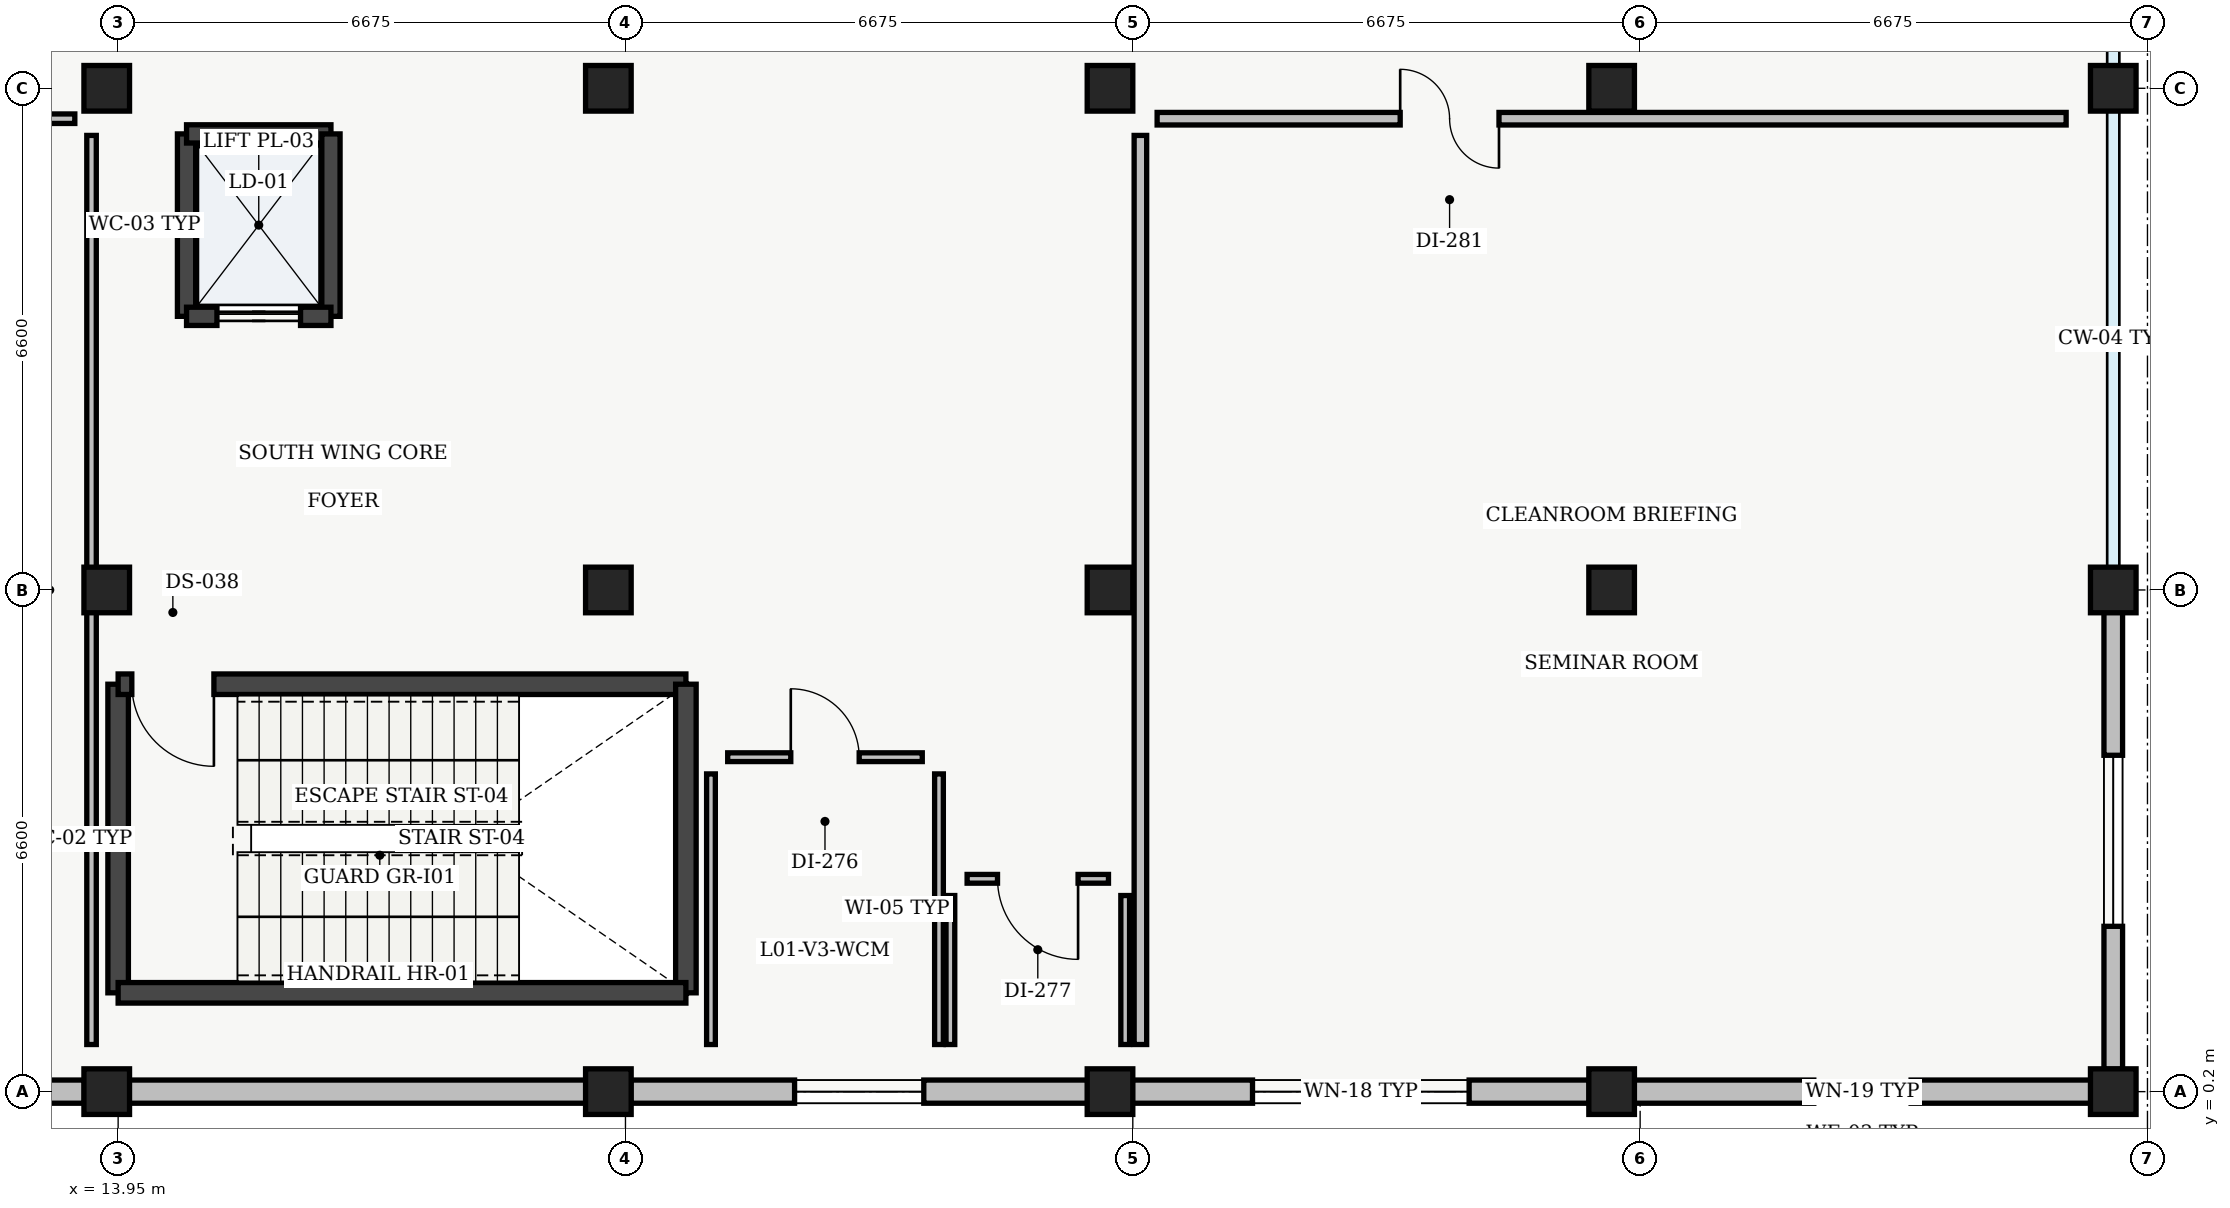
"""IFC4 building model, lengths in metres.
Left out: names, types, materials, properties, quantities, classifications, styles, units other than length and angle.
Written with IfcOpenShell. Run it as: python <this file> out.ifc"""

import sys

from ifc_helpers import new_model, si_unit, direction, frame, frame_2d, origin, origin_2d, place, context, subcontext, project, spatial, rectangle, extrude, element, fill, save


model = new_model("IFC4")
c1 = context("Model", 3, precision=1e-05, world=origin(), true_north=direction((0.0, 1.0)))
c2 = subcontext(c1, "Body", "Model", "MODEL_VIEW")
j1 = project(units=[si_unit("LENGTHUNIT", "METRE"), si_unit("PLANEANGLEUNIT", "RADIAN")], contexts=[c1])
p1 = place(None, origin())
s1 = spatial("IfcSite", under=j1, at=p1, CompositionType="ELEMENT")
p2 = place(p1, origin())
s2 = spatial("IfcBuilding", under=s1, at=p2, CompositionType="ELEMENT")
p3 = place(p2, frame((0.0, 0.0, 5.1)))
s3 = spatial("IfcBuildingStorey", under=s2, at=p3, CompositionType="ELEMENT", Elevation=5.1)
for number, where, z_axis, x_axis in (
    (1, (13.8, 0.2, 0.0), (0.0, 0.0, 1.0), (1.0, 0.0, 0.0)),
    (2, (13.8, 6.8, 0.0), (0.0, 0.0, 1.0), (1.0, 0.0, 0.0)),
    (3, (13.8, 13.4, 0.0), (0.0, 0.0, 1.0), (1.0, 0.0, 0.0)),
    (4, (20.4, 0.2, 0.0), (0.0, 0.0, 1.0), (1.0, 0.0, 0.0)),
    (5, (20.4, 6.8, 0.0), (0.0, 0.0, 1.0), (1.0, 0.0, 0.0)),
    (6, (20.4, 13.4, 0.0), (0.0, 0.0, 1.0), (1.0, 0.0, 0.0)),
    (7, (27.0, 0.2, 0.0), (0.0, 0.0, 1.0), (1.0, 0.0, 0.0)),
    (8, (27.0, 6.8, 0.0), (0.0, 0.0, 1.0), (1.0, 0.0, 0.0)),
    (9, (27.0, 13.4, 0.0), (0.0, 0.0, 1.0), (1.0, 0.0, 0.0)),
    (10, (33.6, 0.2, 0.0), (0.0, 0.0, 1.0), (1.0, 0.0, 0.0)),
    (11, (33.6, 6.8, 0.0), (0.0, 0.0, 1.0), (1.0, 0.0, 0.0)),
    (12, (33.6, 13.4, 0.0), (0.0, 0.0, 1.0), (1.0, 0.0, 0.0)),
    (13, (40.2, 0.2, 0.0), (0.0, 0.0, 1.0), (1.0, 0.0, 0.0)),
    (14, (40.2, 6.8, 0.0), (0.0, 0.0, 1.0), (1.0, 0.0, 0.0)),
    (15, (40.2, 13.4, 0.0), (0.0, 0.0, 1.0), (1.0, 0.0, 0.0)),
):
    element("IfcColumn", number, at=place(p3, frame(where, z_axis=z_axis, x_axis=x_axis)), inside=s3, PredefinedType="COLUMN", context=c2, shape_type="SweptSolid", body=[
        extrude(rectangle(XDim=0.6, YDim=0.6, at=origin_2d()), origin(), (0.0, 0.0, 1.0), 4.3),
    ])
p4 = place(p3, frame((40.2, 6.505, 0.0), z_axis=(0.0, 0.0, 1.0), x_axis=(0.0, -1.0, 0.0)))
e16 = element("IfcWall", 16, at=p4, inside=s3, PredefinedType="STANDARD", context=c2, shape_type="SweptSolid", body=[
    extrude(rectangle(XDim=6.01, YDim=0.245, at=frame_2d((3.005, 0.0))), origin(), (0.0, 0.0, 1.0), 3.785),
])
p5 = place(p4, frame((1.88, 0.0, 0.95)))
e17 = element("IfcOpeningElement", 17, at=p5, cuts=e16, PredefinedType="OPENING", context=c2, shape_type="SweptSolid", body=[
    extrude(rectangle(XDim=2.25, YDim=1.55, at=frame_2d((1.125, 0.775))), frame((0.0, 0.123, 0.0), z_axis=(0.0, -1.0, 0.0), x_axis=(1.0, 0.0, 0.0)), (0.0, 0.0, 1.0), 0.245),
])
p6 = place(p3, frame((39.905, 0.2, 0.0), z_axis=(0.0, 0.0, 1.0), x_axis=(-1.0, 0.0, 0.0)))
e18 = element("IfcWall", 18, at=p6, inside=s3, PredefinedType="STANDARD", context=c2, shape_type="SweptSolid", body=[
    extrude(rectangle(XDim=6.01, YDim=0.305, at=frame_2d((3.005, 0.0))), origin(), (0.0, 0.0, 1.0), 3.785),
])
p7 = place(p6, frame((2.365, 0.0, 0.95)))
e19 = element("IfcOpeningElement", 19, at=p7, cuts=e18, PredefinedType="OPENING", context=c2, shape_type="SweptSolid", body=[
    extrude(rectangle(XDim=1.28, YDim=1.42, at=frame_2d((0.64, 0.71))), frame((0.0, 0.152, 0.0), z_axis=(0.0, -1.0, 0.0), x_axis=(1.0, 0.0, 0.0)), (0.0, 0.0, 1.0), 0.305),
])
p8 = place(p3, frame((33.305, 0.2, 0.0), z_axis=(0.0, 0.0, 1.0), x_axis=(-1.0, 0.0, 0.0)))
e20 = element("IfcWall", 20, at=p8, inside=s3, PredefinedType="STANDARD", context=c2, shape_type="SweptSolid", body=[
    extrude(rectangle(XDim=6.01, YDim=0.305, at=frame_2d((3.005, 0.0))), origin(), (0.0, 0.0, 1.0), 3.785),
])
p9 = place(p8, frame((1.58, 0.0, 0.95)))
e21 = element("IfcOpeningElement", 21, at=p9, cuts=e20, PredefinedType="OPENING", context=c2, shape_type="SweptSolid", body=[
    extrude(rectangle(XDim=2.85, YDim=1.5, at=frame_2d((1.425, 0.75))), frame((0.0, 0.152, 0.0), z_axis=(0.0, -1.0, 0.0), x_axis=(1.0, 0.0, 0.0)), (0.0, 0.0, 1.0), 0.305),
])
p10 = place(p3, frame((26.705, 0.2, 0.0), z_axis=(0.0, 0.0, 1.0), x_axis=(-1.0, 0.0, 0.0)))
e22 = element("IfcWall", 22, at=p10, inside=s3, PredefinedType="STANDARD", context=c2, shape_type="SweptSolid", body=[
    extrude(rectangle(XDim=6.01, YDim=0.305, at=frame_2d((3.005, 0.0))), origin(), (0.0, 0.0, 1.0), 3.785),
])
p11 = place(p10, frame((2.155, 0.0, 0.95)))
e23 = element("IfcOpeningElement", 23, at=p11, cuts=e22, PredefinedType="OPENING", context=c2, shape_type="SweptSolid", body=[
    extrude(rectangle(XDim=1.7, YDim=1.55, at=frame_2d((0.85, 0.775))), frame((0.0, 0.152, 0.0), z_axis=(0.0, -1.0, 0.0), x_axis=(1.0, 0.0, 0.0)), (0.0, 0.0, 1.0), 0.305),
])
p12 = place(p3, frame((20.105, 0.2, 0.0), z_axis=(0.0, 0.0, 1.0), x_axis=(-1.0, 0.0, 0.0)))
e24 = element("IfcWall", 24, at=p12, inside=s3, PredefinedType="STANDARD", context=c2, shape_type="SweptSolid", body=[
    extrude(rectangle(XDim=6.01, YDim=0.305, at=frame_2d((3.005, 0.0))), origin(), (0.0, 0.0, 1.0), 3.785),
])
p13 = place(p3, frame((13.505, 0.2, 0.0), z_axis=(0.0, 0.0, 1.0), x_axis=(-1.0, 0.0, 0.0)))
e25 = element("IfcWall", 25, at=p13, inside=s3, PredefinedType="STANDARD", context=c2, shape_type="SweptSolid", body=[
    extrude(rectangle(XDim=6.01, YDim=0.305, at=frame_2d((3.005, 0.0))), origin(), (0.0, 0.0, 1.0), 3.785),
])
p14 = place(p13, frame((1.73, 0.0, 0.95)))
e26 = element("IfcOpeningElement", 26, at=p14, cuts=e25, PredefinedType="OPENING", context=c2, shape_type="SweptSolid", body=[
    extrude(rectangle(XDim=2.55, YDim=1.75, at=frame_2d((1.275, 0.875))), frame((0.0, 0.152, 0.0), z_axis=(0.0, -1.0, 0.0), x_axis=(1.0, 0.0, 0.0)), (0.0, 0.0, 1.0), 0.305),
])
p15 = place(p3, frame((13.95, 1.5, 0.0), z_axis=(0.0, 0.0, 1.0), x_axis=(0.0, 1.0, 0.0)))
e27 = element("IfcWall", 27, at=p15, inside=s3, PredefinedType="SHEAR", context=c2, shape_type="SweptSolid", body=[
    extrude(rectangle(XDim=4.06, YDim=0.27, at=frame_2d((2.03, 0.0))), origin(), (0.0, 0.0, 1.0), 4.28),
])
p16 = place(p3, frame((13.95, 5.56, 0.0), z_axis=(0.0, 0.0, 1.0), x_axis=(1.0, 0.0, 0.0)))
e28 = element("IfcWall", 28, at=p16, inside=s3, PredefinedType="SHEAR", context=c2, shape_type="SweptSolid", body=[
    extrude(rectangle(XDim=7.47, YDim=0.27, at=frame_2d((3.735, 0.0))), origin(), (0.0, 0.0, 1.0), 4.28),
])
p17 = place(p16, frame((0.18, 0.0, 0.0)))
e29 = element("IfcOpeningElement", 29, at=p17, cuts=e28, PredefinedType="OPENING", context=c2, shape_type="SweptSolid", body=[
    extrude(rectangle(XDim=1.08, YDim=2.15, at=frame_2d((0.54, 1.075))), frame((0.0, 0.135, 0.0), z_axis=(0.0, -1.0, 0.0), x_axis=(1.0, 0.0, 0.0)), (0.0, 0.0, 1.0), 0.27),
])
p18 = place(p3, frame((21.42, 5.56, 0.0), z_axis=(0.0, 0.0, 1.0), x_axis=(0.0, -1.0, 0.0)))
e30 = element("IfcWall", 30, at=p18, inside=s3, PredefinedType="SHEAR", context=c2, shape_type="SweptSolid", body=[
    extrude(rectangle(XDim=4.06, YDim=0.27, at=frame_2d((2.03, 0.0))), origin(), (0.0, 0.0, 1.0), 4.28),
])
p19 = place(p3, frame((21.42, 1.5, 0.0), z_axis=(0.0, 0.0, 1.0), x_axis=(-1.0, 0.0, 0.0)))
e31 = element("IfcWall", 31, at=p19, inside=s3, PredefinedType="SHEAR", context=c2, shape_type="SweptSolid", body=[
    extrude(rectangle(XDim=7.47, YDim=0.27, at=frame_2d((3.735, 0.0))), origin(), (0.0, 0.0, 1.0), 4.28),
])
p20 = place(p3, frame((14.85, 10.4, 0.0), z_axis=(0.0, 0.0, 1.0), x_axis=(0.0, 1.0, 0.0)))
e32 = element("IfcWall", 32, at=p20, inside=s3, PredefinedType="SHEAR", context=c2, shape_type="SweptSolid", body=[
    extrude(rectangle(XDim=2.4, YDim=0.24, at=frame_2d((1.2, 0.0))), origin(), (0.0, 0.0, 1.0), 4.28),
])
p21 = place(p3, frame((14.85, 12.8, 0.0), z_axis=(0.0, 0.0, 1.0), x_axis=(1.0, 0.0, 0.0)))
e33 = element("IfcWall", 33, at=p21, inside=s3, PredefinedType="SHEAR", context=c2, shape_type="SweptSolid", body=[
    extrude(rectangle(XDim=1.9, YDim=0.24, at=frame_2d((0.95, 0.0))), origin(), (0.0, 0.0, 1.0), 4.28),
])
p22 = place(p3, frame((16.75, 12.8, 0.0), z_axis=(0.0, 0.0, 1.0), x_axis=(0.0, -1.0, 0.0)))
e34 = element("IfcWall", 34, at=p22, inside=s3, PredefinedType="SHEAR", context=c2, shape_type="SweptSolid", body=[
    extrude(rectangle(XDim=2.4, YDim=0.24, at=frame_2d((1.2, 0.0))), origin(), (0.0, 0.0, 1.0), 4.28),
])
p23 = place(p3, frame((16.75, 10.4, 0.0), z_axis=(0.0, 0.0, 1.0), x_axis=(-1.0, 0.0, 0.0)))
e35 = element("IfcWall", 35, at=p23, inside=s3, PredefinedType="SHEAR", context=c2, shape_type="SweptSolid", body=[
    extrude(rectangle(XDim=1.9, YDim=0.24, at=frame_2d((0.95, 0.0))), origin(), (0.0, 0.0, 1.0), 4.28),
])
p24 = place(p23, frame((0.4, 0.0, 0.0)))
e36 = element("IfcOpeningElement", 36, at=p24, cuts=e35, PredefinedType="OPENING", context=c2, shape_type="SweptSolid", body=[
    extrude(rectangle(XDim=1.1, YDim=2.2, at=frame_2d((0.55, 1.1))), frame((0.0, 0.12, 0.0), z_axis=(0.0, -1.0, 0.0), x_axis=(1.0, 0.0, 0.0)), (0.0, 0.0, 1.0), 0.24),
])
p25 = place(p3, frame((24.75, 0.82, 0.0), z_axis=(0.0, 0.0, 1.0), x_axis=(0.0, 1.0, 0.0)))
e37 = element("IfcWall", 37, at=p25, inside=s3, PredefinedType="PARTITIONING", context=c2, shape_type="SweptSolid", body=[
    extrude(rectangle(XDim=3.56, YDim=0.115, at=frame_2d((1.78, 0.0))), origin(), (0.0, 0.0, 1.0), 3.95),
])
p26 = place(p3, frame((24.53, 4.6, 0.0), z_axis=(0.0, 0.0, 1.0), x_axis=(-1.0, 0.0, 0.0)))
e38 = element("IfcWall", 38, at=p26, inside=s3, PredefinedType="PARTITIONING", context=c2, shape_type="SweptSolid", body=[
    extrude(rectangle(XDim=2.56, YDim=0.115, at=frame_2d((1.28, 0.0))), origin(), (0.0, 0.0, 1.0), 3.95),
])
p27 = place(p26, frame((0.83, 0.0, 0.0)))
e39 = element("IfcOpeningElement", 39, at=p27, cuts=e38, PredefinedType="OPENING", context=c2, shape_type="SweptSolid", body=[
    extrude(rectangle(XDim=0.9, YDim=2.1, at=frame_2d((0.45, 1.05))), frame((0.0, 0.058, 0.0), z_axis=(0.0, -1.0, 0.0), x_axis=(1.0, 0.0, 0.0)), (0.0, 0.0, 1.0), 0.115),
])
p28 = place(p3, frame((21.75, 4.38, 0.0), z_axis=(0.0, 0.0, 1.0), x_axis=(0.0, -1.0, 0.0)))
e40 = element("IfcWall", 40, at=p28, inside=s3, PredefinedType="PARTITIONING", context=c2, shape_type="SweptSolid", body=[
    extrude(rectangle(XDim=3.56, YDim=0.115, at=frame_2d((1.78, 0.0))), origin(), (0.0, 0.0, 1.0), 3.95),
])
p29 = place(p3, frame((27.2, 0.82, 0.0), z_axis=(0.0, 0.0, 1.0), x_axis=(0.0, 1.0, 0.0)))
e41 = element("IfcWall", 41, at=p29, inside=s3, PredefinedType="PARTITIONING", context=c2, shape_type="SweptSolid", body=[
    extrude(rectangle(XDim=1.96, YDim=0.115, at=frame_2d((0.98, 0.0))), origin(), (0.0, 0.0, 1.0), 3.635),
])
p30 = place(p3, frame((26.98, 3.0, 0.0), z_axis=(0.0, 0.0, 1.0), x_axis=(-1.0, 0.0, 0.0)))
e42 = element("IfcWall", 42, at=p30, inside=s3, PredefinedType="PARTITIONING", context=c2, shape_type="SweptSolid", body=[
    extrude(rectangle(XDim=1.86, YDim=0.115, at=frame_2d((0.93, 0.0))), origin(), (0.0, 0.0, 1.0), 3.95),
])
p31 = place(p30, frame((0.4, 0.0, 0.0)))
e43 = element("IfcOpeningElement", 43, at=p31, cuts=e42, PredefinedType="OPENING", context=c2, shape_type="SweptSolid", body=[
    extrude(rectangle(XDim=1.06, YDim=2.12, at=frame_2d((0.53, 1.06))), frame((0.0, 0.058, 0.0), z_axis=(0.0, -1.0, 0.0), x_axis=(1.0, 0.0, 0.0)), (0.0, 0.0, 1.0), 0.115),
])
p32 = place(p3, frame((24.9, 2.78, 0.0), z_axis=(0.0, 0.0, 1.0), x_axis=(0.0, -1.0, 0.0)))
e44 = element("IfcWall", 44, at=p32, inside=s3, PredefinedType="PARTITIONING", context=c2, shape_type="SweptSolid", body=[
    extrude(rectangle(XDim=1.96, YDim=0.115, at=frame_2d((0.98, 0.0))), origin(), (0.0, 0.0, 1.0), 3.95),
])
p33 = place(p3, frame((13.6, 0.82, 0.0), z_axis=(0.0, 0.0, 1.0), x_axis=(0.0, 1.0, 0.0)))
e45 = element("IfcWall", 45, at=p33, inside=s3, PredefinedType="PARTITIONING", context=c2, shape_type="SweptSolid", body=[
    extrude(rectangle(XDim=11.96, YDim=0.125, at=frame_2d((5.98, 0.0))), origin(), (0.0, 0.0, 1.0), 3.635),
])
p34 = place(p3, frame((13.38, 13.0, 0.0), z_axis=(0.0, 0.0, 1.0), x_axis=(-1.0, 0.0, 0.0)))
e46 = element("IfcWall", 46, at=p34, inside=s3, PredefinedType="PARTITIONING", context=c2, shape_type="SweptSolid", body=[
    extrude(rectangle(XDim=12.16, YDim=0.125, at=frame_2d((6.08, 0.0))), origin(), (0.0, 0.0, 1.0), 3.95),
])
p35 = place(p34, frame((4.488, 0.0, 0.0)))
e47 = element("IfcOpeningElement", 47, at=p35, cuts=e46, PredefinedType="OPENING", context=c2, shape_type="SweptSolid", body=[
    extrude(rectangle(XDim=0.94, YDim=2.12, at=frame_2d((0.47, 1.06))), frame((0.0, 0.062, 0.0), z_axis=(0.0, -1.0, 0.0), x_axis=(1.0, 0.0, 0.0)), (0.0, 0.0, 1.0), 0.125),
])
p36 = place(p3, frame((39.58, 13.0, 0.0), z_axis=(0.0, 0.0, 1.0), x_axis=(-1.0, 0.0, 0.0)))
e48 = element("IfcWall", 48, at=p36, inside=s3, PredefinedType="PARTITIONING", context=c2, shape_type="SweptSolid", body=[
    extrude(rectangle(XDim=11.96, YDim=0.165, at=frame_2d((5.98, 0.0))), origin(), (0.0, 0.0, 1.0), 3.95),
])
p37 = place(p36, frame((7.462, 0.0, 0.0)))
e49 = element("IfcOpeningElement", 49, at=p37, cuts=e48, PredefinedType="OPENING", context=c2, shape_type="SweptSolid", body=[
    extrude(rectangle(XDim=1.3, YDim=2.18, at=frame_2d((0.65, 1.09))), frame((0.0, 0.083, 0.0), z_axis=(0.0, -1.0, 0.0), x_axis=(1.0, 0.0, 0.0)), (0.0, 0.0, 1.0), 0.165),
])
p38 = place(p3, frame((27.4, 12.78, 0.0), z_axis=(0.0, 0.0, 1.0), x_axis=(0.0, -1.0, 0.0)))
e50 = element("IfcWall", 50, at=p38, inside=s3, PredefinedType="PARTITIONING", context=c2, shape_type="SweptSolid", body=[
    extrude(rectangle(XDim=11.96, YDim=0.165, at=frame_2d((5.98, 0.0))), origin(), (0.0, 0.0, 1.0), 3.95),
])
p39 = place(p5, origin())
e51 = element("IfcWindow", 51, at=p39, inside=s3, PartitioningType="SINGLE_PANEL", PredefinedType="WINDOW", context=c2, shape_type="SweptSolid", body=[
    extrude(rectangle(XDim=2.25, YDim=1.55, at=frame_2d((1.125, 0.775))), frame((0.0, 0.03, 0.0), z_axis=(0.0, -1.0, 0.0), x_axis=(1.0, 0.0, 0.0)), (0.0, 0.0, 1.0), 0.06),
])
fill(e17, e51)
p40 = place(p7, origin())
e52 = element("IfcWindow", 52, at=p40, inside=s3, PartitioningType="SINGLE_PANEL", PredefinedType="WINDOW", context=c2, shape_type="SweptSolid", body=[
    extrude(rectangle(XDim=1.28, YDim=1.42, at=frame_2d((0.64, 0.71))), frame((0.0, 0.03, 0.0), z_axis=(0.0, -1.0, 0.0), x_axis=(1.0, 0.0, 0.0)), (0.0, 0.0, 1.0), 0.06),
])
fill(e19, e52)
p41 = place(p9, origin())
e53 = element("IfcWindow", 53, at=p41, inside=s3, PartitioningType="SINGLE_PANEL", PredefinedType="WINDOW", context=c2, shape_type="SweptSolid", body=[
    extrude(rectangle(XDim=2.85, YDim=1.5, at=frame_2d((1.425, 0.75))), frame((0.0, 0.03, 0.0), z_axis=(0.0, -1.0, 0.0), x_axis=(1.0, 0.0, 0.0)), (0.0, 0.0, 1.0), 0.06),
])
fill(e21, e53)
p42 = place(p11, origin())
e54 = element("IfcWindow", 54, at=p42, inside=s3, PartitioningType="SINGLE_PANEL", PredefinedType="WINDOW", context=c2, shape_type="SweptSolid", body=[
    extrude(rectangle(XDim=1.7, YDim=1.55, at=frame_2d((0.85, 0.775))), frame((0.0, 0.03, 0.0), z_axis=(0.0, -1.0, 0.0), x_axis=(1.0, 0.0, 0.0)), (0.0, 0.0, 1.0), 0.06),
])
fill(e23, e54)
p43 = place(p17, origin())
e55 = element("IfcDoor", 55, at=p43, inside=s3, OperationType="SINGLE_SWING_RIGHT", PredefinedType="DOOR", context=c2, shape_type="SweptSolid", body=[
    extrude(rectangle(XDim=1.08, YDim=2.15, at=frame_2d((0.54, 1.075))), frame((0.0, 0.025, 0.0), z_axis=(0.0, -1.0, 0.0), x_axis=(1.0, 0.0, 0.0)), (0.0, 0.0, 1.0), 0.05),
])
fill(e29, e55)
p44 = place(p24, origin())
e56 = element("IfcDoor", 56, at=p44, inside=s3, OperationType="SLIDING_TO_LEFT", PredefinedType="DOOR", context=c2, shape_type="SweptSolid", body=[
    extrude(rectangle(XDim=1.1, YDim=2.2, at=frame_2d((0.55, 1.1))), frame((0.0, 0.025, 0.0), z_axis=(0.0, -1.0, 0.0), x_axis=(1.0, 0.0, 0.0)), (0.0, 0.0, 1.0), 0.05),
])
fill(e36, e56)
p45 = place(p27, origin())
e57 = element("IfcDoor", 57, at=p45, inside=s3, OperationType="SINGLE_SWING_RIGHT", PredefinedType="DOOR", context=c2, shape_type="SweptSolid", body=[
    extrude(rectangle(XDim=0.9, YDim=2.1, at=frame_2d((0.45, 1.05))), frame((0.0, 0.025, 0.0), z_axis=(0.0, -1.0, 0.0), x_axis=(1.0, 0.0, 0.0)), (0.0, 0.0, 1.0), 0.05),
])
fill(e39, e57)
p46 = place(p31, origin())
e58 = element("IfcDoor", 58, at=p46, inside=s3, OperationType="SINGLE_SWING_LEFT", PredefinedType="DOOR", context=c2, shape_type="SweptSolid", body=[
    extrude(rectangle(XDim=1.06, YDim=2.12, at=frame_2d((0.53, 1.06))), frame((0.0, 0.025, 0.0), z_axis=(0.0, -1.0, 0.0), x_axis=(1.0, 0.0, 0.0)), (0.0, 0.0, 1.0), 0.05),
])
fill(e43, e58)
p47 = place(p37, origin())
e59 = element("IfcDoor", 59, at=p47, inside=s3, OperationType="DOUBLE_DOOR_SINGLE_SWING", PredefinedType="DOOR", context=c2, shape_type="SweptSolid", body=[
    extrude(rectangle(XDim=1.3, YDim=2.18, at=frame_2d((0.65, 1.09))), frame((0.0, 0.025, 0.0), z_axis=(0.0, -1.0, 0.0), x_axis=(1.0, 0.0, 0.0)), (0.0, 0.0, 1.0), 0.05),
])
fill(e49, e59)
save(model, sys.argv[1])
